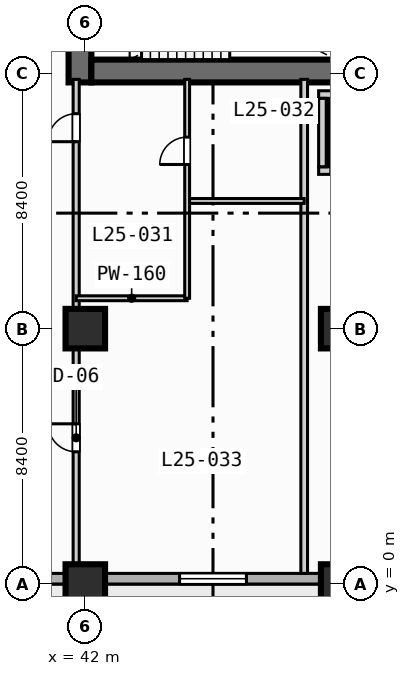
"""IFC4 building model, lengths in metres.
Left out: names, types, materials, properties, quantities, classifications, styles, units other than length and angle.
Written with IfcOpenShell. Run it as: python <this file> out.ifc"""

import sys

from ifc_helpers import new_model, si_unit, direction, frame, frame_2d, origin, origin_2d, place, context, subcontext, project, spatial, rectangle, extrude, element, fill, save


model = new_model("IFC4")
c1 = context("Model", 3, precision=1e-05, world=origin(), true_north=direction((0.0, 1.0)))
c2 = subcontext(c1, "Body", "Model", "MODEL_VIEW")
j1 = project(units=[si_unit("LENGTHUNIT", "METRE"), si_unit("PLANEANGLEUNIT", "RADIAN")], contexts=[c1])
p1 = place(None, origin())
s1 = spatial("IfcSite", under=j1, at=p1, CompositionType="ELEMENT")
p2 = place(p1, origin())
s2 = spatial("IfcBuilding", under=s1, at=p2, CompositionType="ELEMENT")
p3 = place(p2, frame((0.0, 0.0, 107.6)))
s3 = spatial("IfcBuildingStorey", under=s2, at=p3, CompositionType="ELEMENT", Elevation=107.6)
p4 = place(p3, frame((41.825, 16.5, 0.0), z_axis=(0.0, 0.0, 1.0), x_axis=(0.0, 1.0, 0.0)))
e1 = element("IfcWall", 1, at=p4, inside=s3, PredefinedType="SHEAR", context=c2, shape_type="SweptSolid", body=[
    extrude(rectangle(XDim=1.5, YDim=0.75, at=frame_2d((0.75, 0.0))), origin(), (0.0, 0.0, 1.0), 3.55),
])
p5 = place(p3, frame((42.2, 16.875, 0.0), z_axis=(0.0, 0.0, 1.0), x_axis=(1.0, 0.0, 0.0)))
e2 = element("IfcWall", 2, at=p5, inside=s3, PredefinedType="SHEAR", context=c2, shape_type="SweptSolid", body=[
    extrude(rectangle(XDim=16.35, YDim=0.75, at=frame_2d((8.175, 0.0))), origin(), (0.0, 0.0, 1.0), 3.55),
])
for number, where, z_axis, x_axis in (
    (3, (42.0, 0.0, 0.0), (0.0, 0.0, 1.0), (1.0, 0.0, 0.0)),
    (4, (42.0, 8.4, 0.0), (0.0, 0.0, 1.0), (1.0, 0.0, 0.0)),
    (5, (50.4, 0.0, 0.0), (0.0, 0.0, 1.0), (1.0, 0.0, 0.0)),
    (6, (50.4, 8.4, 0.0), (0.0, 0.0, 1.0), (1.0, 0.0, 0.0)),
):
    element("IfcColumn", number, at=place(p3, frame(where, z_axis=z_axis, x_axis=x_axis)), inside=s3, PredefinedType="COLUMN", context=c2, shape_type="SweptSolid", body=[
        extrude(rectangle(XDim=1.3, YDim=1.3, at=origin_2d()), origin(), (0.0, 0.0, 1.0), 3.8),
    ])
p6 = place(p3, frame((72.425, 0.175, 0.0), z_axis=(0.0, 0.0, 1.0), x_axis=(-1.0, 0.0, 0.0)))
e7 = element("IfcWall", 7, at=p6, inside=s3, PredefinedType="STANDARD", context=c2, shape_type="SweptSolid", body=[
    extrude(rectangle(XDim=69.25, YDim=0.35, at=frame_2d((34.625, 0.0))), origin(), (0.0, 0.0, 1.0), 3.55),
])
p7 = place(p6, frame((50.225, 0.0, 0.0)))
e8 = element("IfcOpeningElement", 8, at=p7, cuts=e7, PredefinedType="OPENING", context=c2, shape_type="SweptSolid", body=[
    extrude(rectangle(XDim=1.4, YDim=2.2, at=frame_2d((0.7, 1.1))), frame((0.0, 0.185, 0.0), z_axis=(0.0, -1.0, 0.0), x_axis=(1.0, 0.0, 0.0)), (0.0, 0.0, 1.0), 0.37),
])
p8 = place(p6, frame((33.525, 0.0, 0.85)))
e9 = element("IfcOpeningElement", 9, at=p8, cuts=e7, PredefinedType="OPENING", context=c2, shape_type="SweptSolid", body=[
    extrude(rectangle(XDim=2.2, YDim=1.8, at=frame_2d((1.1, 0.9))), frame((0.0, 0.185, 0.0), z_axis=(0.0, -1.0, 0.0), x_axis=(1.0, 0.0, 0.0)), (0.0, 0.0, 1.0), 0.37),
])
p9 = place(p6, frame((25.125, 0.0, 0.85)))
e10 = element("IfcOpeningElement", 10, at=p9, cuts=e7, PredefinedType="OPENING", context=c2, shape_type="SweptSolid", body=[
    extrude(rectangle(XDim=2.2, YDim=1.8, at=frame_2d((1.1, 0.9))), frame((0.0, 0.185, 0.0), z_axis=(0.0, -1.0, 0.0), x_axis=(1.0, 0.0, 0.0)), (0.0, 0.0, 1.0), 0.37),
])
p10 = place(p6, frame((8.325, 0.0, 0.85)))
e11 = element("IfcOpeningElement", 11, at=p10, cuts=e7, PredefinedType="OPENING", context=c2, shape_type="SweptSolid", body=[
    extrude(rectangle(XDim=2.2, YDim=1.8, at=frame_2d((1.1, 0.9))), frame((0.0, 0.185, 0.0), z_axis=(0.0, -1.0, 0.0), x_axis=(1.0, 0.0, 0.0)), (0.0, 0.0, 1.0), 0.37),
])
p11 = place(p6, frame((64.925, 0.0, 0.85)))
e12 = element("IfcOpeningElement", 12, at=p11, cuts=e7, PredefinedType="OPENING", context=c2, shape_type="SweptSolid", body=[
    extrude(rectangle(XDim=1.8, YDim=1.8, at=frame_2d((0.9, 0.9))), frame((0.0, 0.185, 0.0), z_axis=(0.0, -1.0, 0.0), x_axis=(1.0, 0.0, 0.0)), (0.0, 0.0, 1.0), 0.37),
])
p12 = place(p6, frame((56.525, 0.0, 0.85)))
e13 = element("IfcOpeningElement", 13, at=p12, cuts=e7, PredefinedType="OPENING", context=c2, shape_type="SweptSolid", body=[
    extrude(rectangle(XDim=1.8, YDim=1.8, at=frame_2d((0.9, 0.9))), frame((0.0, 0.185, 0.0), z_axis=(0.0, -1.0, 0.0), x_axis=(1.0, 0.0, 0.0)), (0.0, 0.0, 1.0), 0.37),
])
p13 = place(p6, frame((2.125, 0.0, 0.85)))
e14 = element("IfcOpeningElement", 14, at=p13, cuts=e7, PredefinedType="OPENING", context=c2, shape_type="SweptSolid", body=[
    extrude(rectangle(XDim=1.8, YDim=1.8, at=frame_2d((0.9, 0.9))), frame((0.0, 0.185, 0.0), z_axis=(0.0, -1.0, 0.0), x_axis=(1.0, 0.0, 0.0)), (0.0, 0.0, 1.0), 0.37),
])
p14 = place(p3, frame((49.675, 13.6, 0.0), z_axis=(0.0, 0.0, 1.0), x_axis=(1.0, 0.0, 0.0)))
e15 = element("IfcWall", 15, at=p14, inside=s3, PredefinedType="SOLIDWALL", context=c2, shape_type="SweptSolid", body=[
    extrude(rectangle(XDim=2.25, YDim=0.25, at=frame_2d((1.125, 0.0))), origin(), (0.0, 0.0, 1.0), 3.55),
])
p15 = place(p14, frame((0.4, 0.0, 0.0)))
e16 = element("IfcOpeningElement", 16, at=p15, cuts=e15, PredefinedType="OPENING", context=c2, shape_type="SweptSolid", body=[
    extrude(rectangle(XDim=1.1, YDim=2.15, at=frame_2d((0.55, 1.075))), frame((0.0, 0.135, 0.0), z_axis=(0.0, -1.0, 0.0), x_axis=(1.0, 0.0, 0.0)), (0.0, 0.0, 1.0), 0.27),
])
for number, where, z_axis, x_axis in (
    (17, (49.675, 16.1, 0.0), (0.0, 0.0, 1.0), (1.0, 0.0, 0.0)),
    (18, (49.8, 13.725, 0.0), (0.0, 0.0, 1.0), (0.0, 1.0, 0.0)),
):
    element("IfcWall", number, at=place(p3, frame(where, z_axis=z_axis, x_axis=x_axis)), inside=s3, PredefinedType="SOLIDWALL", context=c2, shape_type="SweptSolid", body=[
        extrude(rectangle(XDim=2.25, YDim=0.25, at=frame_2d((1.125, 0.0))), origin(), (0.0, 0.0, 1.0), 3.55),
    ])
p16 = place(p3, frame((41.7, 0.35, 0.0), z_axis=(0.0, 0.0, 1.0), x_axis=(0.0, 1.0, 0.0)))
e19 = element("IfcWall", 19, at=p16, inside=s3, PredefinedType="PARTITIONING", context=c2, shape_type="SweptSolid", body=[
    extrude(rectangle(XDim=16.25, YDim=0.2, at=frame_2d((8.125, 0.0))), origin(), (0.0, 0.0, 1.0), 2.8),
])
p17 = place(p16, frame((4.0, 0.0, 0.0)))
e20 = element("IfcOpeningElement", 20, at=p17, cuts=e19, PredefinedType="OPENING", context=c2, shape_type="SweptSolid", body=[
    extrude(rectangle(XDim=0.92, YDim=2.1, at=frame_2d((0.46, 1.05))), frame((0.0, 0.11, 0.0), z_axis=(0.0, -1.0, 0.0), x_axis=(1.0, 0.0, 0.0)), (0.0, 0.0, 1.0), 0.22),
])
p18 = place(p16, frame((14.2, 0.0, 0.0)))
e21 = element("IfcOpeningElement", 21, at=p18, cuts=e19, PredefinedType="OPENING", context=c2, shape_type="SweptSolid", body=[
    extrude(rectangle(XDim=0.92, YDim=2.1, at=frame_2d((0.46, 1.05))), frame((0.0, 0.11, 0.0), z_axis=(0.0, -1.0, 0.0), x_axis=(1.0, 0.0, 0.0)), (0.0, 0.0, 1.0), 0.22),
])
p19 = place(p3, frame((49.2, 0.35, 0.0), z_axis=(0.0, 0.0, 1.0), x_axis=(0.0, 1.0, 0.0)))
e22 = element("IfcWall", 22, at=p19, inside=s3, PredefinedType="PARTITIONING", context=c2, shape_type="SweptSolid", body=[
    extrude(rectangle(XDim=16.25, YDim=0.22, at=frame_2d((8.125, 0.0))), origin(), (0.0, 0.0, 1.0), 3.55),
])
p20 = place(p3, frame((41.7, 9.4, 0.0), z_axis=(0.0, 0.0, 1.0), x_axis=(1.0, 0.0, 0.0)))
e23 = element("IfcWall", 23, at=p20, inside=s3, PredefinedType="PARTITIONING", context=c2, shape_type="SweptSolid", body=[
    extrude(rectangle(XDim=3.65, YDim=0.16, at=frame_2d((1.825, 0.0))), origin(), (0.0, 0.0, 1.0), 3.55),
])
p21 = place(p3, frame((45.35, 12.6, 0.0), z_axis=(0.0, 0.0, 1.0), x_axis=(1.0, 0.0, 0.0)))
e24 = element("IfcWall", 24, at=p21, inside=s3, PredefinedType="PARTITIONING", context=c2, shape_type="SweptSolid", body=[
    extrude(rectangle(XDim=3.85, YDim=0.16, at=frame_2d((1.925, 0.0))), origin(), (0.0, 0.0, 1.0), 3.55),
])
p22 = place(p3, frame((45.35, 9.4, 0.0), z_axis=(0.0, 0.0, 1.0), x_axis=(0.0, 1.0, 0.0)))
e25 = element("IfcWall", 25, at=p22, inside=s3, PredefinedType="PARTITIONING", context=c2, shape_type="SweptSolid", body=[
    extrude(rectangle(XDim=7.2, YDim=0.16, at=frame_2d((3.6, 0.0))), origin(), (0.0, 0.0, 1.0), 3.55),
])
p23 = place(p22, frame((4.4, 0.0, 0.0)))
e26 = element("IfcOpeningElement", 26, at=p23, cuts=e25, PredefinedType="OPENING", context=c2, shape_type="SweptSolid", body=[
    extrude(rectangle(XDim=0.9, YDim=2.1, at=frame_2d((0.45, 1.05))), frame((0.0, 0.09, 0.0), z_axis=(0.0, -1.0, 0.0), x_axis=(1.0, 0.0, 0.0)), (0.0, 0.0, 1.0), 0.18),
])
p24 = place(p9, origin())
e27 = element("IfcWindow", 27, at=p24, inside=s3, PartitioningType="SINGLE_PANEL", PredefinedType="WINDOW", context=c2, shape_type="SweptSolid", body=[
    extrude(rectangle(XDim=2.2, YDim=1.8, at=frame_2d((1.1, 0.9))), frame((0.0, 0.03, 0.0), z_axis=(0.0, -1.0, 0.0), x_axis=(1.0, 0.0, 0.0)), (0.0, 0.0, 1.0), 0.06),
])
fill(e10, e27)
p25 = place(p17, origin())
e28 = element("IfcDoor", 28, at=p25, inside=s3, OperationType="SINGLE_SWING_RIGHT", PredefinedType="DOOR", context=c2, shape_type="SweptSolid", body=[
    extrude(rectangle(XDim=0.92, YDim=2.1, at=frame_2d((0.46, 1.05))), frame((0.0, 0.025, 0.0), z_axis=(0.0, -1.0, 0.0), x_axis=(1.0, 0.0, 0.0)), (0.0, 0.0, 1.0), 0.05),
])
fill(e20, e28)
p26 = place(p18, origin())
e29 = element("IfcDoor", 29, at=p26, inside=s3, OperationType="SINGLE_SWING_LEFT", PredefinedType="DOOR", context=c2, shape_type="SweptSolid", body=[
    extrude(rectangle(XDim=0.92, YDim=2.1, at=frame_2d((0.46, 1.05))), frame((0.0, 0.025, 0.0), z_axis=(0.0, -1.0, 0.0), x_axis=(1.0, 0.0, 0.0)), (0.0, 0.0, 1.0), 0.05),
])
fill(e21, e29)
p27 = place(p23, origin())
e30 = element("IfcDoor", 30, at=p27, inside=s3, OperationType="SINGLE_SWING_LEFT", PredefinedType="DOOR", context=c2, shape_type="SweptSolid", body=[
    extrude(rectangle(XDim=0.9, YDim=2.1, at=frame_2d((0.45, 1.05))), frame((0.0, 0.025, 0.0), z_axis=(0.0, -1.0, 0.0), x_axis=(1.0, 0.0, 0.0)), (0.0, 0.0, 1.0), 0.05),
])
fill(e26, e30)
save(model, sys.argv[1])
